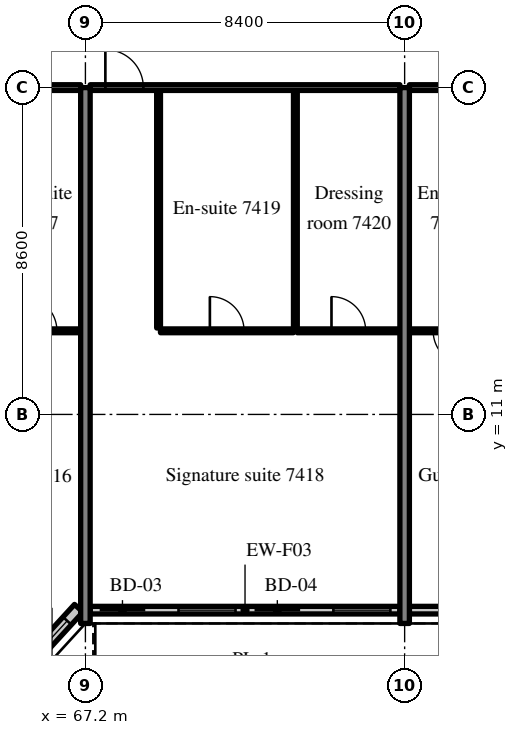
"""IFC4 building model, lengths in metres.
Left out: names, types, materials, properties, quantities, classifications, styles, units other than length and angle.
Written with IfcOpenShell. Run it as: python <this file> out.ifc"""

import sys

from ifc_helpers import new_model, si_unit, direction, frame, frame_2d, origin, place, context, subcontext, project, spatial, rectangle, extrude, source, transform, mapped, element, fill, save


model = new_model("IFC4")
c1 = context("Model", 3, precision=1e-05, world=origin(), true_north=direction((0.0, 1.0)))
c2 = subcontext(c1, "Body", "Model", "MODEL_VIEW")
j1 = project(units=[si_unit("LENGTHUNIT", "METRE"), si_unit("PLANEANGLEUNIT", "RADIAN")], contexts=[c1])
p1 = place(None, origin())
s1 = spatial("IfcSite", under=j1, at=p1, CompositionType="ELEMENT")
p2 = place(p1, origin())
s2 = spatial("IfcBuilding", under=s1, at=p2, CompositionType="ELEMENT")
p3 = place(p2, frame((0.0, 0.0, 309.7)))
s3 = spatial("IfcBuildingStorey", under=s2, at=p3, CompositionType="ELEMENT", Elevation=309.7)
m1 = source(origin(), c2, "Body", "SweptSolid", [
    extrude(rectangle(XDim=14.1, YDim=0.25, at=frame_2d((7.05, 0.0))), origin(), (0.0, 0.0, 1.0), 3.72),
])
for number, where, z_axis, x_axis in (
    (1, (67.2, 5.5, 0.0), (0.0, 0.0, 1.0), (0.0, 1.0, 0.0)),
    (2, (75.6, 5.5, 0.0), (0.0, 0.0, 1.0), (0.0, 1.0, 0.0)),
):
    element("IfcWall", number, at=place(p3, frame(where, z_axis=z_axis, x_axis=x_axis)), inside=s3, PredefinedType="SHEAR", context=c2, shape_type="MappedRepresentation", body=[
        mapped(m1, transform((0.0, 0.0, 0.0), scale=1.0)),
    ])
m2 = source(origin(), c2, "Body", "SweptSolid", [
    extrude(rectangle(XDim=2.398, YDim=0.3, at=frame_2d((1.199, 0.0))), origin(), (0.0, 0.0, 1.0), 3.72),
])
p4 = place(p3, frame((65.404, 4.131, 0.0), z_axis=(0.0, 0.0, 1.0), x_axis=(0.675374189419, 0.737475222815, 0.0)))
e3 = element("IfcWall", 3, at=p4, inside=s3, PredefinedType="SOLIDWALL", context=c2, shape_type="MappedRepresentation", body=[
    mapped(m2, transform((0.0, 0.0, 0.0), scale=1.0)),
])
m3 = source(origin(), c2, "Body", "SweptSolid", [
    extrude(rectangle(XDim=1.5, YDim=2.0, at=frame_2d((0.75, 1.0))), frame((0.0, 0.16, 0.0), z_axis=(0.0, -1.0, 0.0), x_axis=(1.0, 0.0, 0.0)), (0.0, 0.0, 1.0), 0.32),
])
p5 = place(p4, frame((0.449, 0.0, 0.9)))
e4 = element("IfcOpeningElement", 4, at=p5, cuts=e3, PredefinedType="OPENING", context=c2, shape_type="MappedRepresentation", body=[
    mapped(m3, transform((0.0, 0.0, 0.0), scale=1.0)),
])
m4 = source(origin(), c2, "Body", "SweptSolid", [
    extrude(rectangle(XDim=8.15, YDim=0.2, at=frame_2d((4.075, 0.0))), origin(), (0.0, 0.0, 1.0), 3.17),
])
p6 = place(p3, frame((67.325, 5.85, 0.0), z_axis=(0.0, 0.0, 1.0), x_axis=(1.0, 0.0, 0.0)))
e5 = element("IfcWall", 5, at=p6, inside=s3, PredefinedType="SOLIDWALL", context=c2, shape_type="MappedRepresentation", body=[
    mapped(m4, transform((0.0, 0.0, 0.0), scale=1.0)),
])
m5 = source(origin(), c2, "Body", "SweptSolid", [
    extrude(rectangle(XDim=1.2, YDim=2.4, at=frame_2d((0.6, 1.2))), frame((0.0, 0.11, 0.0), z_axis=(0.0, -1.0, 0.0), x_axis=(1.0, 0.0, 0.0)), (0.0, 0.0, 1.0), 0.22),
])
p7 = place(p6, frame((0.25, 0.0, 0.0)))
e6 = element("IfcOpeningElement", 6, at=p7, cuts=e5, PredefinedType="OPENING", context=c2, shape_type="MappedRepresentation", body=[
    mapped(m5, transform((0.0, 0.0, 0.0), scale=1.0)),
])
m6 = source(origin(), c2, "Body", "SweptSolid", [
    extrude(rectangle(XDim=1.5, YDim=1.5, at=frame_2d((0.75, 0.75))), frame((0.0, 0.11, 0.0), z_axis=(0.0, -1.0, 0.0), x_axis=(1.0, 0.0, 0.0)), (0.0, 0.0, 1.0), 0.22),
])
p8 = place(p6, frame((2.325, 0.0, 0.9)))
e7 = element("IfcOpeningElement", 7, at=p8, cuts=e5, PredefinedType="OPENING", context=c2, shape_type="MappedRepresentation", body=[
    mapped(m6, transform((0.0, 0.0, 0.0), scale=1.0)),
])
p9 = place(p6, frame((4.325, 0.0, 0.0)))
e8 = element("IfcOpeningElement", 8, at=p9, cuts=e5, PredefinedType="OPENING", context=c2, shape_type="MappedRepresentation", body=[
    mapped(m5, transform((0.0, 0.0, 0.0), scale=1.0)),
])
p10 = place(p6, frame((6.4, 0.0, 0.9)))
e9 = element("IfcOpeningElement", 9, at=p10, cuts=e5, PredefinedType="OPENING", context=c2, shape_type="MappedRepresentation", body=[
    mapped(m6, transform((0.0, 0.0, 0.0), scale=1.0)),
])
m7 = source(origin(), c2, "Body", "SweptSolid", [
    extrude(rectangle(XDim=6.53, YDim=0.2, at=frame_2d((3.265, 0.0))), origin(), (0.0, 0.0, 1.0), 3.17),
])
p11 = place(p3, frame((75.725, 5.85, 0.0), z_axis=(0.0, 0.0, 1.0), x_axis=(1.0, 0.0, 0.0)))
e10 = element("IfcWall", 10, at=p11, inside=s3, PredefinedType="SOLIDWALL", context=c2, shape_type="MappedRepresentation", body=[
    mapped(m7, transform((0.0, 0.0, 0.0), scale=1.0)),
])
p12 = place(p11, frame((0.883, 0.0, 0.9)))
e11 = element("IfcOpeningElement", 11, at=p12, cuts=e10, PredefinedType="OPENING", context=c2, shape_type="MappedRepresentation", body=[
    mapped(m6, transform((0.0, 0.0, 0.0), scale=1.0)),
])
p13 = place(p11, frame((4.147, 0.0, 0.9)))
e12 = element("IfcOpeningElement", 12, at=p13, cuts=e10, PredefinedType="OPENING", context=c2, shape_type="MappedRepresentation", body=[
    mapped(m6, transform((0.0, 0.0, 0.0), scale=1.0)),
])
m8 = source(origin(), c2, "Body", "SweptSolid", [
    extrude(rectangle(XDim=2.15, YDim=0.1, at=frame_2d((1.075, 0.0))), origin(), (0.0, 0.0, 1.0), 3.72),
])
p14 = place(p3, frame((64.925, 13.2, 0.0), z_axis=(0.0, 0.0, 1.0), x_axis=(1.0, 0.0, 0.0)))
e13 = element("IfcWall", 13, at=p14, inside=s3, PredefinedType="PARTITIONING", context=c2, shape_type="MappedRepresentation", body=[
    mapped(m8, transform((0.0, 0.0, 0.0), scale=1.0)),
])
m9 = source(origin(), c2, "Body", "SweptSolid", [
    extrude(rectangle(XDim=0.9, YDim=2.1, at=frame_2d((0.45, 1.05))), frame((0.0, 0.06, 0.0), z_axis=(0.0, -1.0, 0.0), x_axis=(1.0, 0.0, 0.0)), (0.0, 0.0, 1.0), 0.12),
])
p15 = place(p14, frame((0.625, 0.0, 0.0)))
e14 = element("IfcOpeningElement", 14, at=p15, cuts=e13, PredefinedType="OPENING", context=c2, shape_type="MappedRepresentation", body=[
    mapped(m9, transform((0.0, 0.0, 0.0), scale=1.0)),
])
m10 = source(origin(), c2, "Body", "SweptSolid", [
    extrude(rectangle(XDim=4.0, YDim=0.15, at=frame_2d((2.0, 0.0))), origin(), (0.0, 0.0, 1.0), 3.02),
])
p16 = place(p3, frame((63.075, 19.6, 0.0), z_axis=(0.0, 0.0, 1.0), x_axis=(1.0, 0.0, 0.0)))
e15 = element("IfcWall", 15, at=p16, inside=s3, PredefinedType="PARTITIONING", context=c2, shape_type="MappedRepresentation", body=[
    mapped(m10, transform((0.0, 0.0, 0.0), scale=1.0)),
])
m11 = source(origin(), c2, "Body", "SweptSolid", [
    extrude(rectangle(XDim=1.0, YDim=2.1, at=frame_2d((0.5, 1.05))), frame((0.0, 0.085, 0.0), z_axis=(0.0, -1.0, 0.0), x_axis=(1.0, 0.0, 0.0)), (0.0, 0.0, 1.0), 0.17),
])
p17 = place(p16, frame((0.4, 0.0, 0.0)))
e16 = element("IfcOpeningElement", 16, at=p17, cuts=e15, PredefinedType="OPENING", context=c2, shape_type="MappedRepresentation", body=[
    mapped(m11, transform((0.0, 0.0, 0.0), scale=1.0)),
])
m12 = source(origin(), c2, "Body", "SweptSolid", [
    extrude(rectangle(XDim=6.25, YDim=0.1, at=frame_2d((3.125, 0.0))), origin(), (0.0, 0.0, 1.0), 3.72),
])
for number, where, z_axis, x_axis in (
    (17, (69.125, 13.275, 0.0), (0.0, 0.0, 1.0), (0.0, 1.0, 0.0)),
    (18, (72.725, 13.275, 0.0), (0.0, 0.0, 1.0), (0.0, 1.0, 0.0)),
):
    element("IfcWall", number, at=place(p3, frame(where, z_axis=z_axis, x_axis=x_axis)), inside=s3, PredefinedType="PARTITIONING", context=c2, shape_type="MappedRepresentation", body=[
        mapped(m12, transform((0.0, 0.0, 0.0), scale=1.0)),
    ])
m13 = source(origin(), c2, "Body", "SweptSolid", [
    extrude(rectangle(XDim=3.5, YDim=0.1, at=frame_2d((1.75, 0.0))), origin(), (0.0, 0.0, 1.0), 3.72),
])
p18 = place(p3, frame((69.175, 13.2, 0.0), z_axis=(0.0, 0.0, 1.0), x_axis=(1.0, 0.0, 0.0)))
e19 = element("IfcWall", 19, at=p18, inside=s3, PredefinedType="PARTITIONING", context=c2, shape_type="MappedRepresentation", body=[
    mapped(m13, transform((0.0, 0.0, 0.0), scale=1.0)),
])
p19 = place(p18, frame((1.3, 0.0, 0.0)))
e20 = element("IfcOpeningElement", 20, at=p19, cuts=e19, PredefinedType="OPENING", context=c2, shape_type="MappedRepresentation", body=[
    mapped(m9, transform((0.0, 0.0, 0.0), scale=1.0)),
])
m14 = source(origin(), c2, "Body", "SweptSolid", [
    extrude(rectangle(XDim=2.7, YDim=0.1, at=frame_2d((1.35, 0.0))), origin(), (0.0, 0.0, 1.0), 3.72),
])
p20 = place(p3, frame((72.775, 13.2, 0.0), z_axis=(0.0, 0.0, 1.0), x_axis=(1.0, 0.0, 0.0)))
e21 = element("IfcWall", 21, at=p20, inside=s3, PredefinedType="PARTITIONING", context=c2, shape_type="MappedRepresentation", body=[
    mapped(m14, transform((0.0, 0.0, 0.0), scale=1.0)),
])
p21 = place(p20, frame((0.9, 0.0, 0.0)))
e22 = element("IfcOpeningElement", 22, at=p21, cuts=e21, PredefinedType="OPENING", context=c2, shape_type="MappedRepresentation", body=[
    mapped(m9, transform((0.0, 0.0, 0.0), scale=1.0)),
])
m15 = source(origin(), c2, "Body", "SweptSolid", [
    extrude(rectangle(XDim=8.15, YDim=0.15, at=frame_2d((4.075, 0.0))), origin(), (0.0, 0.0, 1.0), 3.02),
])
p22 = place(p3, frame((67.325, 19.6, 0.0), z_axis=(0.0, 0.0, 1.0), x_axis=(1.0, 0.0, 0.0)))
e23 = element("IfcWall", 23, at=p22, inside=s3, PredefinedType="PARTITIONING", context=c2, shape_type="MappedRepresentation", body=[
    mapped(m15, transform((0.0, 0.0, 0.0), scale=1.0)),
])
p23 = place(p22, frame((0.4, 0.0, 0.0)))
e24 = element("IfcOpeningElement", 24, at=p23, cuts=e23, PredefinedType="OPENING", context=c2, shape_type="MappedRepresentation", body=[
    mapped(m11, transform((0.0, 0.0, 0.0), scale=1.0)),
])
p24 = place(p3, frame((75.725, 13.2, 0.0), z_axis=(0.0, 0.0, 1.0), x_axis=(1.0, 0.0, 0.0)))
e25 = element("IfcWall", 25, at=p24, inside=s3, PredefinedType="PARTITIONING", context=c2, shape_type="MappedRepresentation", body=[
    mapped(m8, transform((0.0, 0.0, 0.0), scale=1.0)),
])
p25 = place(p24, frame((0.625, 0.0, 0.0)))
e26 = element("IfcOpeningElement", 26, at=p25, cuts=e25, PredefinedType="OPENING", context=c2, shape_type="MappedRepresentation", body=[
    mapped(m9, transform((0.0, 0.0, 0.0), scale=1.0)),
])
p26 = place(p3, frame((75.725, 19.6, 0.0), z_axis=(0.0, 0.0, 1.0), x_axis=(1.0, 0.0, 0.0)))
e27 = element("IfcWall", 27, at=p26, inside=s3, PredefinedType="PARTITIONING", context=c2, shape_type="MappedRepresentation", body=[
    mapped(m10, transform((0.0, 0.0, 0.0), scale=1.0)),
])
p27 = place(p26, frame((2.6, 0.0, 0.0)))
e28 = element("IfcOpeningElement", 28, at=p27, cuts=e27, PredefinedType="OPENING", context=c2, shape_type="MappedRepresentation", body=[
    mapped(m11, transform((0.0, 0.0, 0.0), scale=1.0)),
])
m16 = source(origin(), c2, "Body", "SweptSolid", [
    extrude(rectangle(XDim=1.5, YDim=2.0, at=frame_2d((0.75, 1.0))), frame((0.0, 0.03, 0.0), z_axis=(0.0, -1.0, 0.0), x_axis=(1.0, 0.0, 0.0)), (0.0, 0.0, 1.0), 0.06),
])
p28 = place(p5, origin())
e29 = element("IfcWindow", 29, at=p28, inside=s3, PartitioningType="SINGLE_PANEL", PredefinedType="WINDOW", context=c2, shape_type="MappedRepresentation", body=[
    mapped(m16, transform((0.0, 0.0, 0.0), scale=1.0)),
])
fill(e4, e29)
m17 = source(origin(), c2, "Body", "SweptSolid", [
    extrude(rectangle(XDim=1.2, YDim=2.4, at=frame_2d((0.6, 1.2))), frame((0.0, 0.025, 0.0), z_axis=(0.0, -1.0, 0.0), x_axis=(1.0, 0.0, 0.0)), (0.0, 0.0, 1.0), 0.05),
])
p29 = place(p7, origin())
e30 = element("IfcDoor", 30, at=p29, inside=s3, OperationType="SLIDING_TO_LEFT", PredefinedType="DOOR", context=c2, shape_type="MappedRepresentation", body=[
    mapped(m17, transform((0.0, 0.0, 0.0), scale=1.0)),
])
fill(e6, e30)
m18 = source(origin(), c2, "Body", "SweptSolid", [
    extrude(rectangle(XDim=1.5, YDim=1.5, at=frame_2d((0.75, 0.75))), frame((0.0, 0.03, 0.0), z_axis=(0.0, -1.0, 0.0), x_axis=(1.0, 0.0, 0.0)), (0.0, 0.0, 1.0), 0.06),
])
p30 = place(p8, origin())
e31 = element("IfcWindow", 31, at=p30, inside=s3, PartitioningType="SINGLE_PANEL", PredefinedType="WINDOW", context=c2, shape_type="MappedRepresentation", body=[
    mapped(m18, transform((0.0, 0.0, 0.0), scale=1.0)),
])
fill(e7, e31)
p31 = place(p9, origin())
e32 = element("IfcDoor", 32, at=p31, inside=s3, OperationType="SLIDING_TO_RIGHT", PredefinedType="DOOR", context=c2, shape_type="MappedRepresentation", body=[
    mapped(m17, transform((0.0, 0.0, 0.0), scale=1.0)),
])
fill(e8, e32)
p32 = place(p10, origin())
e33 = element("IfcWindow", 33, at=p32, inside=s3, PartitioningType="SINGLE_PANEL", PredefinedType="WINDOW", context=c2, shape_type="MappedRepresentation", body=[
    mapped(m18, transform((0.0, 0.0, 0.0), scale=1.0)),
])
fill(e9, e33)
m19 = source(origin(), c2, "Body", "SweptSolid", [
    extrude(rectangle(XDim=0.9, YDim=2.1, at=frame_2d((0.45, 1.05))), frame((0.0, 0.025, 0.0), z_axis=(0.0, -1.0, 0.0), x_axis=(1.0, 0.0, 0.0)), (0.0, 0.0, 1.0), 0.05),
])
p33 = place(p15, origin())
e34 = element("IfcDoor", 34, at=p33, inside=s3, OperationType="SINGLE_SWING_LEFT", PredefinedType="DOOR", context=c2, shape_type="MappedRepresentation", body=[
    mapped(m19, transform((0.0, 0.0, 0.0), scale=1.0)),
])
fill(e14, e34)
p34 = place(p19, origin())
e35 = element("IfcDoor", 35, at=p34, inside=s3, OperationType="SINGLE_SWING_LEFT", PredefinedType="DOOR", context=c2, shape_type="MappedRepresentation", body=[
    mapped(m19, transform((0.0, 0.0, 0.0), scale=1.0)),
])
fill(e20, e35)
p35 = place(p21, origin())
e36 = element("IfcDoor", 36, at=p35, inside=s3, OperationType="SINGLE_SWING_LEFT", PredefinedType="DOOR", context=c2, shape_type="MappedRepresentation", body=[
    mapped(m19, transform((0.0, 0.0, 0.0), scale=1.0)),
])
fill(e22, e36)
m20 = source(origin(), c2, "Body", "SweptSolid", [
    extrude(rectangle(XDim=1.0, YDim=2.1, at=frame_2d((0.5, 1.05))), frame((0.0, 0.025, 0.0), z_axis=(0.0, -1.0, 0.0), x_axis=(1.0, 0.0, 0.0)), (0.0, 0.0, 1.0), 0.05),
])
p36 = place(p23, origin())
e37 = element("IfcDoor", 37, at=p36, inside=s3, OperationType="SINGLE_SWING_LEFT", PredefinedType="DOOR", context=c2, shape_type="MappedRepresentation", body=[
    mapped(m20, transform((0.0, 0.0, 0.0), scale=1.0)),
])
fill(e24, e37)
p37 = place(p25, origin())
e38 = element("IfcDoor", 38, at=p37, inside=s3, OperationType="SINGLE_SWING_RIGHT", PredefinedType="DOOR", context=c2, shape_type="MappedRepresentation", body=[
    mapped(m19, transform((0.0, 0.0, 0.0), scale=1.0)),
])
fill(e26, e38)
save(model, sys.argv[1])
